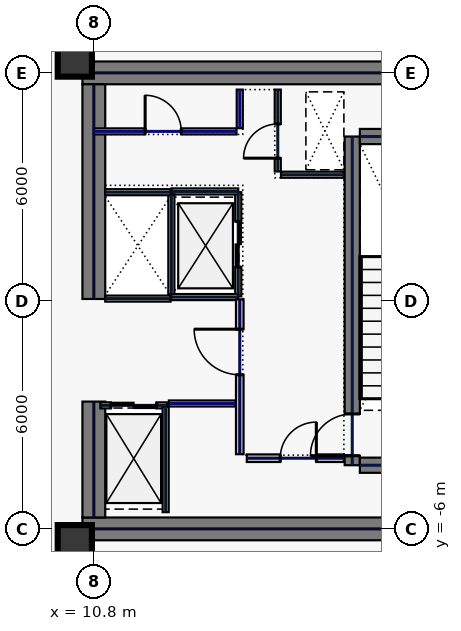
"""IFC4 building model, lengths in metres.
Left out: names, types, materials, properties, quantities, classifications, styles, units other than length and angle.
Written with IfcOpenShell. Run it as: python <this file> out.ifc"""

import sys

from ifc_helpers import new_model, si_unit, direction, frame, frame_2d, origin, origin_2d, place, context, subcontext, project, spatial, rectangle, hollow_rectangle, extrude, element, fill, save


model = new_model("IFC4")
c1 = context("Model", 3, precision=1e-05, world=origin(), true_north=direction((0.0, 1.0)))
c2 = subcontext(c1, "Body", "Model", "MODEL_VIEW")
j1 = project(units=[si_unit("LENGTHUNIT", "METRE"), si_unit("PLANEANGLEUNIT", "RADIAN")], contexts=[c1])
p1 = place(None, origin())
s1 = spatial("IfcSite", under=j1, at=p1, CompositionType="ELEMENT")
p2 = place(p1, origin())
s2 = spatial("IfcBuilding", under=s1, at=p2, CompositionType="ELEMENT")
p3 = place(p2, frame((0.0, 0.0, 214.2)))
s3 = spatial("IfcBuildingStorey", under=s2, at=p3, CompositionType="ELEMENT", Elevation=214.2)
for number, where, z_axis, x_axis in (
    (1, (10.5, 6.0, 0.0), (0.0, 0.0, 1.0), (1.0, 0.0, 0.0)),
    (2, (10.5, -6.0, 0.0), (0.0, 0.0, 1.0), (1.0, 0.0, 0.0)),
):
    element("IfcWall", number, at=place(p3, frame(where, z_axis=z_axis, x_axis=x_axis)), inside=s3, PredefinedType="SHEAR", context=c2, shape_type="SweptSolid", body=[
        extrude(rectangle(XDim=11.5, YDim=0.6, at=frame_2d((5.75, 0.0))), origin(), (0.0, 0.0, 1.0), 3.74),
    ])
p4 = place(p3, frame((10.8, -5.7, 0.0), z_axis=(0.0, 0.0, 1.0), x_axis=(0.0, 1.0, 0.0)))
e3 = element("IfcWall", 3, at=p4, inside=s3, PredefinedType="SHEAR", context=c2, shape_type="SweptSolid", body=[
    extrude(rectangle(XDim=3.05, YDim=0.6, at=frame_2d((1.525, 0.0))), origin(), (0.0, 0.0, 1.0), 3.74),
])
p5 = place(p3, frame((10.8, 0.05, 0.0), z_axis=(0.0, 0.0, 1.0), x_axis=(0.0, 1.0, 0.0)))
e4 = element("IfcWall", 4, at=p5, inside=s3, PredefinedType="SHEAR", context=c2, shape_type="SweptSolid", body=[
    extrude(rectangle(XDim=5.65, YDim=0.6, at=frame_2d((2.825, 0.0))), origin(), (0.0, 0.0, 1.0), 3.74),
])
p6 = place(p3, frame((17.6, -4.325, 0.0), z_axis=(0.0, 0.0, 1.0), x_axis=(0.0, 1.0, 0.0)))
e5 = element("IfcWall", 5, at=p6, inside=s3, PredefinedType="SHEAR", context=c2, shape_type="SweptSolid", body=[
    extrude(rectangle(XDim=8.65, YDim=0.4, at=frame_2d((4.325, 0.0))), origin(), (0.0, 0.0, 1.0), 3.74),
])
p7 = place(p6, frame((0.25, 0.0, 0.0)))
e6 = element("IfcOpeningElement", 6, at=p7, cuts=e5, PredefinedType="OPENING", context=c2, shape_type="SweptSolid", body=[
    extrude(rectangle(XDim=1.1, YDim=2.2, at=frame_2d((0.55, 1.1))), frame((0.0, 0.21, 0.0), z_axis=(0.0, -1.0, 0.0), x_axis=(1.0, 0.0, 0.0)), (0.0, 0.0, 1.0), 0.42),
])
for number, where, z_axis, x_axis in (
    (7, (17.8, -4.325, 0.0), (0.0, 0.0, 1.0), (1.0, 0.0, 0.0)),
    (8, (17.8, 4.325, 0.0), (0.0, 0.0, 1.0), (1.0, 0.0, 0.0)),
):
    element("IfcWall", number, at=place(p3, frame(where, z_axis=z_axis, x_axis=x_axis)), inside=s3, PredefinedType="SHEAR", context=c2, shape_type="SweptSolid", body=[
        extrude(rectangle(XDim=3.4, YDim=0.4, at=frame_2d((1.7, 0.0))), origin(), (0.0, 0.0, 1.0), 3.74),
    ])
for number, where, z_axis, x_axis in (
    (9, (10.3, -6.35, 0.0), (0.0, 0.0, 1.0), (1.0, 0.0, 0.0)),
    (10, (10.3, 6.35, 0.0), (0.0, 0.0, 1.0), (1.0, 0.0, 0.0)),
):
    element("IfcColumn", number, at=place(p3, frame(where, z_axis=z_axis, x_axis=x_axis)), inside=s3, PredefinedType="COLUMN", context=c2, shape_type="SweptSolid", body=[
        extrude(hollow_rectangle(XDim=0.9, YDim=0.9, WallThickness=0.04, at=origin_2d()), origin(), (0.0, 0.0, 1.0), 3.74),
    ])
p8 = place(p3, frame((14.6, 0.12, 0.0), z_axis=(0.0, 0.0, 1.0), x_axis=(0.0, 1.0, 0.0)))
e11 = element("IfcWall", 11, at=p8, inside=s3, PredefinedType="PARTITIONING", context=c2, shape_type="SweptSolid", body=[
    extrude(rectangle(XDim=2.74, YDim=0.16, at=frame_2d((1.37, 0.0))), origin(), (0.0, 0.0, 1.0), 3.74),
])
p9 = place(p8, frame((0.77, 0.0, 0.0)))
e12 = element("IfcOpeningElement", 12, at=p9, cuts=e11, PredefinedType="OPENING", context=c2, shape_type="SweptSolid", body=[
    extrude(rectangle(XDim=1.2, YDim=2.2, at=frame_2d((0.6, 1.1))), frame((0.0, 0.09, 0.0), z_axis=(0.0, -1.0, 0.0), x_axis=(1.0, 0.0, 0.0)), (0.0, 0.0, 1.0), 0.18),
])
for number, where, z_axis, x_axis in (
    (13, (12.84, 0.1, 0.0), (0.0, 0.0, 1.0), (1.0, 0.0, 0.0)),
    (14, (12.84, 2.88, 0.0), (0.0, 0.0, 1.0), (1.0, 0.0, 0.0)),
):
    element("IfcWall", number, at=place(p3, frame(where, z_axis=z_axis, x_axis=x_axis)), inside=s3, PredefinedType="PARTITIONING", context=c2, shape_type="SweptSolid", body=[
        extrude(rectangle(XDim=1.76, YDim=0.16, at=frame_2d((0.88, 0.0))), origin(), (0.0, 0.0, 1.0), 3.74),
    ])
p10 = place(p3, frame((12.84, 0.18, 0.0), z_axis=(0.0, 0.0, 1.0), x_axis=(0.0, 1.0, 0.0)))
e15 = element("IfcWall", 15, at=p10, inside=s3, PredefinedType="PARTITIONING", context=c2, shape_type="SweptSolid", body=[
    extrude(rectangle(XDim=2.62, YDim=0.16, at=frame_2d((1.31, 0.0))), origin(), (0.0, 0.0, 1.0), 3.74),
])
p11 = place(p3, frame((10.97, -2.75, 0.0), z_axis=(0.0, 0.0, 1.0), x_axis=(1.0, 0.0, 0.0)))
e16 = element("IfcWall", 16, at=p11, inside=s3, PredefinedType="PARTITIONING", context=c2, shape_type="SweptSolid", body=[
    extrude(rectangle(XDim=1.76, YDim=0.16, at=frame_2d((0.88, 0.0))), origin(), (0.0, 0.0, 1.0), 3.74),
])
p12 = place(p11, frame((0.28, 0.0, 0.0)))
e17 = element("IfcOpeningElement", 17, at=p12, cuts=e16, PredefinedType="OPENING", context=c2, shape_type="SweptSolid", body=[
    extrude(rectangle(XDim=1.2, YDim=2.2, at=frame_2d((0.6, 1.1))), frame((0.0, 0.09, 0.0), z_axis=(0.0, -1.0, 0.0), x_axis=(1.0, 0.0, 0.0)), (0.0, 0.0, 1.0), 0.18),
])
for number, where, z_axis, x_axis in (
    (18, (11.1, 0.06, 0.0), (0.0, 0.0, 1.0), (1.0, 0.0, 0.0)),
    (19, (11.1, 2.86, 0.0), (0.0, 0.0, 1.0), (1.0, 0.0, 0.0)),
):
    element("IfcWall", number, at=place(p3, frame(where, z_axis=z_axis, x_axis=x_axis)), inside=s3, PredefinedType="PARTITIONING", context=c2, shape_type="SweptSolid", body=[
        extrude(rectangle(XDim=1.72, YDim=0.16, at=frame_2d((0.86, 0.0))), origin(), (0.0, 0.0, 1.0), 3.74),
    ])
p13 = place(p3, frame((15.64, 3.405, 0.0), z_axis=(0.0, 0.0, 1.0), x_axis=(0.0, 1.0, 0.0)))
e20 = element("IfcWall", 20, at=p13, inside=s3, PredefinedType="PARTITIONING", context=c2, shape_type="SweptSolid", body=[
    extrude(rectangle(XDim=2.155, YDim=0.16, at=frame_2d((1.078, 0.0))), origin(), (0.0, 0.0, 1.0), 3.74),
])
p14 = place(p13, frame((0.35, 0.0, 0.0)))
e21 = element("IfcOpeningElement", 21, at=p14, cuts=e20, PredefinedType="OPENING", context=c2, shape_type="SweptSolid", body=[
    extrude(rectangle(XDim=0.9, YDim=2.2, at=frame_2d((0.45, 1.1))), frame((0.0, 0.09, 0.0), z_axis=(0.0, -1.0, 0.0), x_axis=(1.0, 0.0, 0.0)), (0.0, 0.0, 1.0), 0.18),
])
p15 = place(p3, frame((15.725, 3.32, 0.0), z_axis=(0.0, 0.0, 1.0), x_axis=(1.0, 0.0, 0.0)))
e22 = element("IfcWall", 22, at=p15, inside=s3, PredefinedType="PARTITIONING", context=c2, shape_type="SweptSolid", body=[
    extrude(rectangle(XDim=1.655, YDim=0.16, at=frame_2d((0.827, 0.0))), origin(), (0.0, 0.0, 1.0), 3.74),
])
p16 = place(p3, frame((14.825, -4.14, 0.0), z_axis=(0.0, 0.0, 1.0), x_axis=(1.0, 0.0, 0.0)))
e23 = element("IfcWall", 23, at=p16, inside=s3, PredefinedType="SOLIDWALL", context=c2, shape_type="SweptSolid", body=[
    extrude(rectangle(XDim=2.555, YDim=0.2, at=frame_2d((1.277, 0.0))), origin(), (0.0, 0.0, 1.0), 3.74),
])
p17 = place(p16, frame((0.88, 0.0, 0.0)))
e24 = element("IfcOpeningElement", 24, at=p17, cuts=e23, PredefinedType="OPENING", context=c2, shape_type="SweptSolid", body=[
    extrude(rectangle(XDim=0.95, YDim=2.2, at=frame_2d((0.475, 1.1))), frame((0.0, 0.11, 0.0), z_axis=(0.0, -1.0, 0.0), x_axis=(1.0, 0.0, 0.0)), (0.0, 0.0, 1.0), 0.22),
])
p18 = place(p3, frame((12.775, -2.7, 0.0), z_axis=(0.0, 0.0, 1.0), x_axis=(1.0, 0.0, 0.0)))
e25 = element("IfcWall", 25, at=p18, inside=s3, PredefinedType="PARTITIONING", context=c2, shape_type="SweptSolid", body=[
    extrude(rectangle(XDim=1.76, YDim=0.16, at=frame_2d((0.88, 0.0))), origin(), (0.0, 0.0, 1.0), 3.74),
])
p19 = place(p3, frame((12.69, -5.56, 0.0), z_axis=(0.0, 0.0, 1.0), x_axis=(0.0, 1.0, 0.0)))
e26 = element("IfcWall", 26, at=p19, inside=s3, PredefinedType="PARTITIONING", context=c2, shape_type="SweptSolid", body=[
    extrude(rectangle(XDim=2.775, YDim=0.16, at=frame_2d((1.388, 0.0))), origin(), (0.0, 0.0, 1.0), 3.74),
])
p20 = place(p3, frame((10.8, 4.46, 0.0), z_axis=(0.0, 0.0, 1.0), x_axis=(1.0, 0.0, 0.0)))
e27 = element("IfcWall", 27, at=p20, inside=s3, PredefinedType="PARTITIONING", context=c2, shape_type="SweptSolid", body=[
    extrude(rectangle(XDim=3.755, YDim=0.16, at=frame_2d((1.877, 0.0))), origin(), (0.0, 0.0, 1.0), 3.74),
])
p21 = place(p20, frame((1.35, 0.0, 0.0)))
e28 = element("IfcOpeningElement", 28, at=p21, cuts=e27, PredefinedType="OPENING", context=c2, shape_type="SweptSolid", body=[
    extrude(rectangle(XDim=0.95, YDim=2.2, at=frame_2d((0.475, 1.1))), frame((0.0, 0.09, 0.0), z_axis=(0.0, -1.0, 0.0), x_axis=(1.0, 0.0, 0.0)), (0.0, 0.0, 1.0), 0.18),
])
p22 = place(p3, frame((14.64, 4.545, 0.0), z_axis=(0.0, 0.0, 1.0), x_axis=(0.0, 1.0, 0.0)))
e29 = element("IfcWall", 29, at=p22, inside=s3, PredefinedType="PARTITIONING", context=c2, shape_type="SweptSolid", body=[
    extrude(rectangle(XDim=1.015, YDim=0.16, at=frame_2d((0.508, 0.0))), origin(), (0.0, 0.0, 1.0), 3.74),
])
p23 = place(p3, frame((14.64, -4.035, 0.0), z_axis=(0.0, 0.0, 1.0), x_axis=(0.0, 1.0, 0.0)))
e30 = element("IfcWall", 30, at=p23, inside=s3, PredefinedType="SOLIDWALL", context=c2, shape_type="SweptSolid", body=[
    extrude(rectangle(XDim=4.075, YDim=0.2, at=frame_2d((2.038, 0.0))), origin(), (0.0, 0.0, 1.0), 3.74),
])
p24 = place(p23, frame((2.09, 0.0, 0.0)))
e31 = element("IfcOpeningElement", 31, at=p24, cuts=e30, PredefinedType="OPENING", context=c2, shape_type="SweptSolid", body=[
    extrude(rectangle(XDim=1.2, YDim=2.2, at=frame_2d((0.6, 1.1))), frame((0.0, 0.11, 0.0), z_axis=(0.0, -1.0, 0.0), x_axis=(1.0, 0.0, 0.0)), (0.0, 0.0, 1.0), 0.22),
])
p25 = place(p3, frame((10.63, 7.435, 0.0), z_axis=(0.0, 0.0, 1.0), x_axis=(0.0, -1.0, 0.0)))
e32 = element("IfcWall", 32, at=p25, inside=s3, PredefinedType="PARTITIONING", context=c2, shape_type="SweptSolid", body=[
    extrude(rectangle(XDim=1.015, YDim=0.16, at=frame_2d((0.508, 0.0))), origin(), (0.0, 0.0, 1.0), 3.74),
])
p26 = place(p3, frame((10.63, -6.42, 0.0), z_axis=(0.0, 0.0, 1.0), x_axis=(0.0, -1.0, 0.0)))
e33 = element("IfcWall", 33, at=p26, inside=s3, PredefinedType="PARTITIONING", context=c2, shape_type="SweptSolid", body=[
    extrude(rectangle(XDim=0.915, YDim=0.16, at=frame_2d((0.458, 0.0))), origin(), (0.0, 0.0, 1.0), 2.135),
])
p27 = place(p7, origin())
e34 = element("IfcDoor", 34, at=p27, inside=s3, OperationType="SINGLE_SWING_LEFT", PredefinedType="DOOR", context=c2, shape_type="SweptSolid", body=[
    extrude(rectangle(XDim=1.1, YDim=2.2, at=frame_2d((0.55, 1.1))), frame((0.0, 0.025, 0.0), z_axis=(0.0, -1.0, 0.0), x_axis=(1.0, 0.0, 0.0)), (0.0, 0.0, 1.0), 0.05),
])
fill(e6, e34)
p28 = place(p9, origin())
e35 = element("IfcDoor", 35, at=p28, inside=s3, OperationType="SLIDING_TO_LEFT", PredefinedType="DOOR", context=c2, shape_type="SweptSolid", body=[
    extrude(rectangle(XDim=1.2, YDim=2.2, at=frame_2d((0.6, 1.1))), frame((0.0, 0.025, 0.0), z_axis=(0.0, -1.0, 0.0), x_axis=(1.0, 0.0, 0.0)), (0.0, 0.0, 1.0), 0.05),
])
fill(e12, e35)
p29 = place(p12, origin())
e36 = element("IfcDoor", 36, at=p29, inside=s3, OperationType="SLIDING_TO_LEFT", PredefinedType="DOOR", context=c2, shape_type="SweptSolid", body=[
    extrude(rectangle(XDim=1.2, YDim=2.2, at=frame_2d((0.6, 1.1))), frame((0.0, 0.025, 0.0), z_axis=(0.0, -1.0, 0.0), x_axis=(1.0, 0.0, 0.0)), (0.0, 0.0, 1.0), 0.05),
])
fill(e17, e36)
p30 = place(p14, origin())
e37 = element("IfcDoor", 37, at=p30, inside=s3, OperationType="SINGLE_SWING_LEFT", PredefinedType="DOOR", context=c2, shape_type="SweptSolid", body=[
    extrude(rectangle(XDim=0.9, YDim=2.2, at=frame_2d((0.45, 1.1))), frame((0.0, 0.025, 0.0), z_axis=(0.0, -1.0, 0.0), x_axis=(1.0, 0.0, 0.0)), (0.0, 0.0, 1.0), 0.05),
])
fill(e21, e37)
p31 = place(p17, origin())
e38 = element("IfcDoor", 38, at=p31, inside=s3, OperationType="SINGLE_SWING_RIGHT", PredefinedType="DOOR", context=c2, shape_type="SweptSolid", body=[
    extrude(rectangle(XDim=0.95, YDim=2.2, at=frame_2d((0.475, 1.1))), frame((0.0, 0.025, 0.0), z_axis=(0.0, -1.0, 0.0), x_axis=(1.0, 0.0, 0.0)), (0.0, 0.0, 1.0), 0.05),
])
fill(e24, e38)
p32 = place(p21, origin())
e39 = element("IfcDoor", 39, at=p32, inside=s3, OperationType="SINGLE_SWING_LEFT", PredefinedType="DOOR", context=c2, shape_type="SweptSolid", body=[
    extrude(rectangle(XDim=0.95, YDim=2.2, at=frame_2d((0.475, 1.1))), frame((0.0, 0.025, 0.0), z_axis=(0.0, -1.0, 0.0), x_axis=(1.0, 0.0, 0.0)), (0.0, 0.0, 1.0), 0.05),
])
fill(e28, e39)
p33 = place(p24, origin())
e40 = element("IfcDoor", 40, at=p33, inside=s3, OperationType="SINGLE_SWING_RIGHT", PredefinedType="DOOR", context=c2, shape_type="SweptSolid", body=[
    extrude(rectangle(XDim=1.2, YDim=2.2, at=frame_2d((0.6, 1.1))), frame((0.0, 0.025, 0.0), z_axis=(0.0, -1.0, 0.0), x_axis=(1.0, 0.0, 0.0)), (0.0, 0.0, 1.0), 0.05),
])
fill(e31, e40)
save(model, sys.argv[1])
